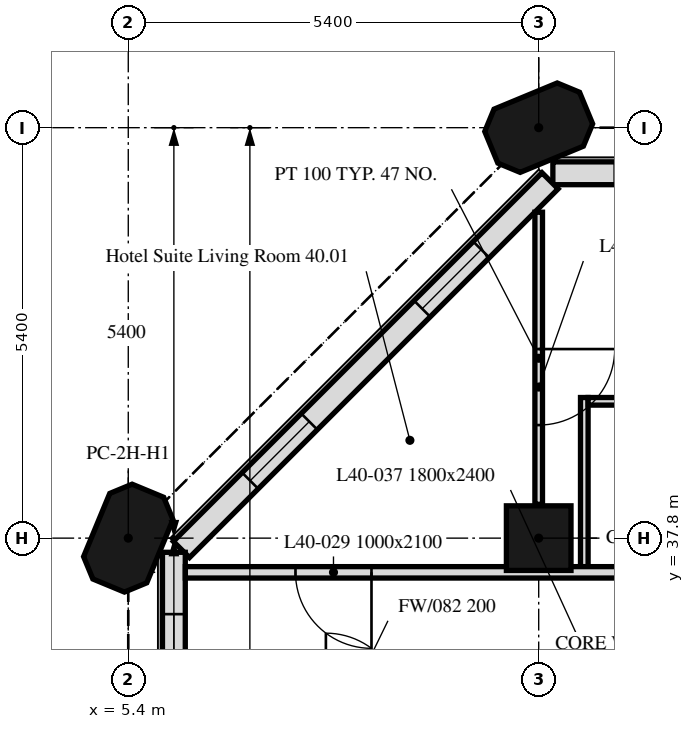
"""IFC4 building model, lengths in metres.
Left out: names, types, materials, properties, quantities, classifications, styles, units other than length and angle.
Written with IfcOpenShell. Run it as: python <this file> out.ifc"""

import sys

from ifc_helpers import new_model, si_unit, direction, frame, frame_2d, origin, origin_2d, place, context, subcontext, project, spatial, polyline, rectangle, outline, extrude, element, fill, save


model = new_model("IFC4")
c1 = context("Model", 3, precision=1e-05, world=origin(), true_north=direction((0.0, 1.0)))
c2 = subcontext(c1, "Body", "Model", "MODEL_VIEW")
j1 = project(units=[si_unit("LENGTHUNIT", "METRE"), si_unit("PLANEANGLEUNIT", "RADIAN")], contexts=[c1])
p1 = place(None, origin())
s1 = spatial("IfcSite", under=j1, at=p1, CompositionType="ELEMENT")
p2 = place(p1, origin())
s2 = spatial("IfcBuilding", under=s1, at=p2, CompositionType="ELEMENT")
p3 = place(p2, frame((0.0, 0.0, 169.3)))
s3 = spatial("IfcBuildingStorey", under=s2, at=p3, CompositionType="ELEMENT", Elevation=169.3)
p4 = place(p3, frame((5.4, 37.8, 0.0), z_axis=(0.0, 0.0, 1.0), x_axis=(0.382683432365, 0.923879532511, 0.0)))
e1 = element("IfcColumn", 1, at=p4, inside=s3, PredefinedType="COLUMN", context=c2, shape_type="SweptSolid", body=[
    extrude(outline(polyline([(-0.45, -0.45), (0.45, -0.45), (0.675, -0.225), (0.675, 0.225), (0.45, 0.45), (-0.45, 0.45), (-0.675, 0.225), (-0.675, -0.225), (-0.45, -0.45)])), origin(), (0.0, 0.0, 1.0), 3.0),
])
p5 = place(p3, frame((10.8, 37.8, 0.0), z_axis=(0.0, 0.0, 1.0), x_axis=(1.0, 0.0, 0.0)))
e2 = element("IfcColumn", 2, at=p5, inside=s3, PredefinedType="COLUMN", context=c2, shape_type="SweptSolid", body=[
    extrude(rectangle(XDim=0.85, YDim=0.85, at=origin_2d()), origin(), (0.0, 0.0, 1.0), 3.0),
])
p6 = place(p3, frame((10.8, 43.2, 0.0), z_axis=(0.0, 0.0, 1.0), x_axis=(0.923879532511, 0.382683432365, 0.0)))
e3 = element("IfcColumn", 3, at=p6, inside=s3, PredefinedType="COLUMN", context=c2, shape_type="SweptSolid", body=[
    extrude(outline(polyline([(-0.45, -0.45), (0.45, -0.45), (0.675, -0.225), (0.675, 0.225), (0.45, 0.45), (-0.45, 0.45), (-0.675, 0.225), (-0.675, -0.225), (-0.45, -0.45)])), origin(), (0.0, 0.0, 1.0), 3.0),
])
p7 = place(p3, frame((43.014, 42.6, 0.0), z_axis=(0.0, 0.0, 1.0), x_axis=(-1.0, 0.0, 0.0)))
e4 = element("IfcWall", 4, at=p7, inside=s3, PredefinedType="SOLIDWALL", context=c2, shape_type="SweptSolid", body=[
    extrude(rectangle(XDim=32.027, YDim=0.3, at=frame_2d((16.014, 0.0))), origin(), (0.0, 0.0, 1.0), 3.0),
])
p8 = place(p7, frame((2.764, 0.0, 0.9)))
e5 = element("IfcOpeningElement", 5, at=p8, cuts=e4, PredefinedType="OPENING", context=c2, shape_type="SweptSolid", body=[
    extrude(rectangle(XDim=1.1, YDim=1.7, at=frame_2d((0.55, 0.85))), frame((0.0, 0.16, 0.0), z_axis=(0.0, -1.0, 0.0), x_axis=(1.0, 0.0, 0.0)), (0.0, 0.0, 1.0), 0.32),
])
p9 = place(p7, frame((6.214, 0.0, 0.9)))
e6 = element("IfcOpeningElement", 6, at=p9, cuts=e4, PredefinedType="OPENING", context=c2, shape_type="SweptSolid", body=[
    extrude(rectangle(XDim=3.4, YDim=1.7, at=frame_2d((1.7, 0.85))), frame((0.0, 0.16, 0.0), z_axis=(0.0, -1.0, 0.0), x_axis=(1.0, 0.0, 0.0)), (0.0, 0.0, 1.0), 0.32),
])
p10 = place(p7, frame((13.564, 0.0, 0.9)))
e7 = element("IfcOpeningElement", 7, at=p10, cuts=e4, PredefinedType="OPENING", context=c2, shape_type="SweptSolid", body=[
    extrude(rectangle(XDim=1.1, YDim=1.7, at=frame_2d((0.55, 0.85))), frame((0.0, 0.16, 0.0), z_axis=(0.0, -1.0, 0.0), x_axis=(1.0, 0.0, 0.0)), (0.0, 0.0, 1.0), 0.32),
])
p11 = place(p7, frame((17.014, 0.0, 0.9)))
e8 = element("IfcOpeningElement", 8, at=p11, cuts=e4, PredefinedType="OPENING", context=c2, shape_type="SweptSolid", body=[
    extrude(rectangle(XDim=3.4, YDim=1.7, at=frame_2d((1.7, 0.85))), frame((0.0, 0.16, 0.0), z_axis=(0.0, -1.0, 0.0), x_axis=(1.0, 0.0, 0.0)), (0.0, 0.0, 1.0), 0.32),
])
p12 = place(p7, frame((24.364, 0.0, 0.9)))
e9 = element("IfcOpeningElement", 9, at=p12, cuts=e4, PredefinedType="OPENING", context=c2, shape_type="SweptSolid", body=[
    extrude(rectangle(XDim=1.1, YDim=1.7, at=frame_2d((0.55, 0.85))), frame((0.0, 0.16, 0.0), z_axis=(0.0, -1.0, 0.0), x_axis=(1.0, 0.0, 0.0)), (0.0, 0.0, 1.0), 0.32),
])
p13 = place(p7, frame((27.814, 0.0, 0.9)))
e10 = element("IfcOpeningElement", 10, at=p13, cuts=e4, PredefinedType="OPENING", context=c2, shape_type="SweptSolid", body=[
    extrude(rectangle(XDim=3.4, YDim=1.7, at=frame_2d((1.7, 0.85))), frame((0.0, 0.16, 0.0), z_axis=(0.0, -1.0, 0.0), x_axis=(1.0, 0.0, 0.0)), (0.0, 0.0, 1.0), 0.32),
])
p14 = place(p3, frame((10.949, 42.501, 0.0), z_axis=(0.0, 0.0, 1.0), x_axis=(-0.707106781187, -0.707106781187, 0.0)))
e11 = element("IfcWall", 11, at=p14, inside=s3, PredefinedType="SOLIDWALL", context=c2, shape_type="SweptSolid", body=[
    extrude(rectangle(XDim=6.86, YDim=0.3, at=frame_2d((3.43, 0.0))), origin(), (0.0, 0.0, 1.0), 3.0),
])
p15 = place(p14, frame((1.28, 0.0, 0.9)))
e12 = element("IfcOpeningElement", 12, at=p15, cuts=e11, PredefinedType="OPENING", context=c2, shape_type="SweptSolid", body=[
    extrude(rectangle(XDim=1.1, YDim=1.7, at=frame_2d((0.55, 0.85))), frame((0.0, 0.16, 0.0), z_axis=(0.0, -1.0, 0.0), x_axis=(1.0, 0.0, 0.0)), (0.0, 0.0, 1.0), 0.32),
])
p16 = place(p14, frame((4.48, 0.0, 0.9)))
e13 = element("IfcOpeningElement", 13, at=p16, cuts=e11, PredefinedType="OPENING", context=c2, shape_type="SweptSolid", body=[
    extrude(rectangle(XDim=1.1, YDim=1.7, at=frame_2d((0.55, 0.85))), frame((0.0, 0.16, 0.0), z_axis=(0.0, -1.0, 0.0), x_axis=(1.0, 0.0, 0.0)), (0.0, 0.0, 1.0), 0.32),
])
p17 = place(p3, frame((6.0, 37.614, 0.0), z_axis=(0.0, 0.0, 1.0), x_axis=(0.0, -1.0, 0.0)))
e14 = element("IfcWall", 14, at=p17, inside=s3, PredefinedType="SOLIDWALL", context=c2, shape_type="SweptSolid", body=[
    extrude(rectangle(XDim=5.214, YDim=0.3, at=frame_2d((2.607, 0.0))), origin(), (0.0, 0.0, 1.0), 3.0),
])
p18 = place(p17, frame((0.814, 0.0, 0.9)))
e15 = element("IfcOpeningElement", 15, at=p18, cuts=e14, PredefinedType="OPENING", context=c2, shape_type="SweptSolid", body=[
    extrude(rectangle(XDim=1.1, YDim=1.7, at=frame_2d((0.55, 0.85))), frame((0.0, 0.16, 0.0), z_axis=(0.0, -1.0, 0.0), x_axis=(1.0, 0.0, 0.0)), (0.0, 0.0, 1.0), 0.32),
])
p19 = place(p17, frame((2.764, 0.0, 0.9)))
e16 = element("IfcOpeningElement", 16, at=p19, cuts=e14, PredefinedType="OPENING", context=c2, shape_type="SweptSolid", body=[
    extrude(rectangle(XDim=1.1, YDim=1.7, at=frame_2d((0.55, 0.85))), frame((0.0, 0.16, 0.0), z_axis=(0.0, -1.0, 0.0), x_axis=(1.0, 0.0, 0.0)), (0.0, 0.0, 1.0), 0.32),
])
p20 = place(p3, frame((10.8, 42.088, 0.0), z_axis=(0.0, 0.0, 1.0), x_axis=(0.0, -1.0, 0.0)))
e17 = element("IfcWall", 17, at=p20, inside=s3, PredefinedType="PARTITIONING", context=c2, shape_type="SweptSolid", body=[
    extrude(rectangle(XDim=3.843, YDim=0.1, at=frame_2d((1.921, 0.0))), origin(), (0.0, 0.0, 1.0), 3.0),
])
p21 = place(p20, frame((1.8, 0.0, 0.0)))
e18 = element("IfcOpeningElement", 18, at=p21, cuts=e17, PredefinedType="OPENING", context=c2, shape_type="SweptSolid", body=[
    extrude(rectangle(XDim=1.0, YDim=2.1, at=frame_2d((0.5, 1.05))), frame((0.0, 0.05, 0.0), z_axis=(0.0, -1.0, 0.0), x_axis=(1.0, 0.0, 0.0)), (0.0, 0.0, 1.0), 0.1),
])
p22 = place(p3, frame((11.4, 37.425, 0.0), z_axis=(0.0, 0.0, 1.0), x_axis=(0.0, 1.0, 0.0)))
e19 = element("IfcWall", 19, at=p22, inside=s3, PredefinedType="PARTITIONING", context=c2, shape_type="SweptSolid", body=[
    extrude(rectangle(XDim=2.225, YDim=0.1, at=frame_2d((1.112, 0.0))), origin(), (0.0, 0.0, 1.0), 3.0),
])
p23 = place(p3, frame((11.45, 39.6, 0.0), z_axis=(0.0, 0.0, 1.0), x_axis=(1.0, 0.0, 0.0)))
e20 = element("IfcWall", 20, at=p23, inside=s3, PredefinedType="PARTITIONING", context=c2, shape_type="SweptSolid", body=[
    extrude(rectangle(XDim=2.4, YDim=0.1, at=frame_2d((1.2, 0.0))), origin(), (0.0, 0.0, 1.0), 3.0),
])
p24 = place(p3, frame((47.849, 37.35, 0.0), z_axis=(0.0, 0.0, 1.0), x_axis=(-1.0, 0.0, 0.0)))
e21 = element("IfcWall", 21, at=p24, inside=s3, PredefinedType="PARTITIONING", context=c2, shape_type="SweptSolid", body=[
    extrude(rectangle(XDim=41.698, YDim=0.15, at=frame_2d((20.849, 0.0))), origin(), (0.0, 0.0, 1.0), 3.0),
])
p25 = place(p24, frame((39.249, 0.0, 0.0)))
e22 = element("IfcOpeningElement", 22, at=p25, cuts=e21, PredefinedType="OPENING", context=c2, shape_type="SweptSolid", body=[
    extrude(rectangle(XDim=1.0, YDim=2.1, at=frame_2d((0.5, 1.05))), frame((0.0, 0.075, 0.0), z_axis=(0.0, -1.0, 0.0), x_axis=(1.0, 0.0, 0.0)), (0.0, 0.0, 1.0), 0.15),
])
p26 = place(p24, frame((27.649, 0.0, 0.0)))
e23 = element("IfcOpeningElement", 23, at=p26, cuts=e21, PredefinedType="OPENING", context=c2, shape_type="SweptSolid", body=[
    extrude(rectangle(XDim=1.0, YDim=2.1, at=frame_2d((0.5, 1.05))), frame((0.0, 0.075, 0.0), z_axis=(0.0, -1.0, 0.0), x_axis=(1.0, 0.0, 0.0)), (0.0, 0.0, 1.0), 0.15),
])
p27 = place(p24, frame((22.249, 0.0, 0.0)))
e24 = element("IfcOpeningElement", 24, at=p27, cuts=e21, PredefinedType="OPENING", context=c2, shape_type="SweptSolid", body=[
    extrude(rectangle(XDim=1.0, YDim=2.1, at=frame_2d((0.5, 1.05))), frame((0.0, 0.075, 0.0), z_axis=(0.0, -1.0, 0.0), x_axis=(1.0, 0.0, 0.0)), (0.0, 0.0, 1.0), 0.15),
])
p28 = place(p24, frame((17.649, 0.0, 0.0)))
e25 = element("IfcOpeningElement", 25, at=p28, cuts=e21, PredefinedType="OPENING", context=c2, shape_type="SweptSolid", body=[
    extrude(rectangle(XDim=1.0, YDim=2.1, at=frame_2d((0.5, 1.05))), frame((0.0, 0.075, 0.0), z_axis=(0.0, -1.0, 0.0), x_axis=(1.0, 0.0, 0.0)), (0.0, 0.0, 1.0), 0.15),
])
p29 = place(p24, frame((2.744, 0.0, 0.0)))
e26 = element("IfcOpeningElement", 26, at=p29, cuts=e21, PredefinedType="OPENING", context=c2, shape_type="SweptSolid", body=[
    extrude(rectangle(XDim=1.0, YDim=2.1, at=frame_2d((0.5, 1.05))), frame((0.0, 0.075, 0.0), z_axis=(0.0, -1.0, 0.0), x_axis=(1.0, 0.0, 0.0)), (0.0, 0.0, 1.0), 0.15),
])
p30 = place(p15, origin())
e27 = element("IfcWindow", 27, at=p30, inside=s3, PartitioningType="SINGLE_PANEL", PredefinedType="WINDOW", context=c2, shape_type="SweptSolid", body=[
    extrude(rectangle(XDim=1.1, YDim=1.7, at=frame_2d((0.55, 0.85))), frame((0.0, 0.03, 0.0), z_axis=(0.0, -1.0, 0.0), x_axis=(1.0, 0.0, 0.0)), (0.0, 0.0, 1.0), 0.06),
])
fill(e12, e27)
p31 = place(p16, origin())
e28 = element("IfcWindow", 28, at=p31, inside=s3, PartitioningType="SINGLE_PANEL", PredefinedType="WINDOW", context=c2, shape_type="SweptSolid", body=[
    extrude(rectangle(XDim=1.1, YDim=1.7, at=frame_2d((0.55, 0.85))), frame((0.0, 0.03, 0.0), z_axis=(0.0, -1.0, 0.0), x_axis=(1.0, 0.0, 0.0)), (0.0, 0.0, 1.0), 0.06),
])
fill(e13, e28)
p32 = place(p18, origin())
e29 = element("IfcWindow", 29, at=p32, inside=s3, PartitioningType="SINGLE_PANEL", PredefinedType="WINDOW", context=c2, shape_type="SweptSolid", body=[
    extrude(rectangle(XDim=1.1, YDim=1.7, at=frame_2d((0.55, 0.85))), frame((0.0, 0.03, 0.0), z_axis=(0.0, -1.0, 0.0), x_axis=(1.0, 0.0, 0.0)), (0.0, 0.0, 1.0), 0.06),
])
fill(e15, e29)
p33 = place(p21, origin())
e30 = element("IfcDoor", 30, at=p33, inside=s3, OperationType="SINGLE_SWING_RIGHT", PredefinedType="DOOR", context=c2, shape_type="SweptSolid", body=[
    extrude(rectangle(XDim=1.0, YDim=2.1, at=frame_2d((0.5, 1.05))), frame((0.0, 0.025, 0.0), z_axis=(0.0, -1.0, 0.0), x_axis=(1.0, 0.0, 0.0)), (0.0, 0.0, 1.0), 0.05),
])
fill(e18, e30)
p34 = place(p25, origin())
e31 = element("IfcDoor", 31, at=p34, inside=s3, OperationType="SINGLE_SWING_LEFT", PredefinedType="DOOR", context=c2, shape_type="SweptSolid", body=[
    extrude(rectangle(XDim=1.0, YDim=2.1, at=frame_2d((0.5, 1.05))), frame((0.0, 0.025, 0.0), z_axis=(0.0, -1.0, 0.0), x_axis=(1.0, 0.0, 0.0)), (0.0, 0.0, 1.0), 0.05),
])
fill(e22, e31)
save(model, sys.argv[1])
